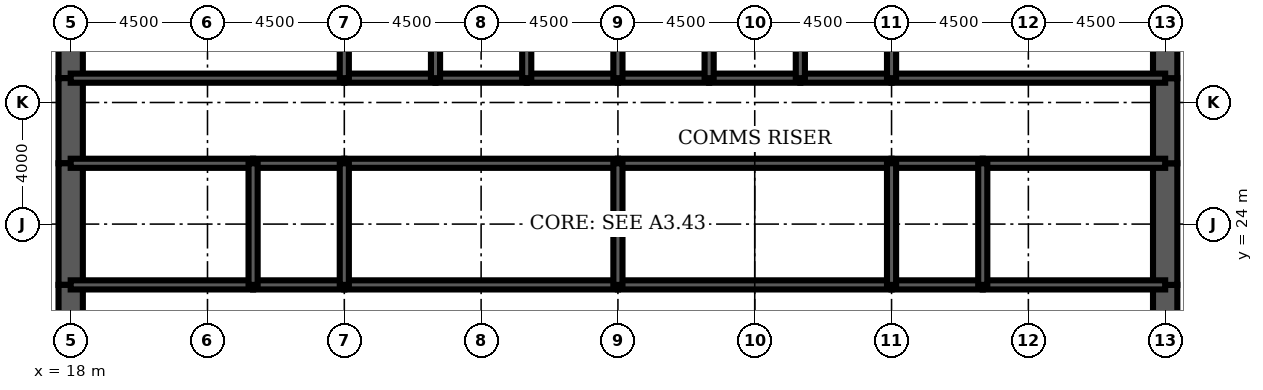
"""IFC4 building model, lengths in metres.
Left out: names, types, materials, properties, quantities, classifications, styles, units other than length and angle.
Written with IfcOpenShell. Run it as: python <this file> out.ifc"""

import sys

from ifc_helpers import new_model, si_unit, direction, frame, frame_2d, origin, place, context, subcontext, project, spatial, rectangle, extrude, element, fill, save


model = new_model("IFC4")
c1 = context("Model", 3, precision=1e-05, world=origin(), true_north=direction((0.0, 1.0)))
c2 = subcontext(c1, "Body", "Model", "MODEL_VIEW")
j1 = project(units=[si_unit("LENGTHUNIT", "METRE"), si_unit("PLANEANGLEUNIT", "RADIAN")], contexts=[c1])
p1 = place(None, origin())
s1 = spatial("IfcSite", under=j1, at=p1, CompositionType="ELEMENT")
p2 = place(p1, origin())
s2 = spatial("IfcBuilding", under=s1, at=p2, CompositionType="ELEMENT")
p3 = place(p2, frame((0.0, 0.0, 185.8)))
s3 = spatial("IfcBuildingStorey", under=s2, at=p3, CompositionType="ELEMENT", Elevation=185.8)
p4 = place(p3, frame((18.0, 32.0, 0.0), z_axis=(0.0, 0.0, 1.0), x_axis=(0.0, -1.0, 0.0)))
e1 = element("IfcWall", 1, at=p4, inside=s3, PredefinedType="SHEAR", context=c2, shape_type="SweptSolid", body=[
    extrude(rectangle(XDim=3.2, YDim=0.8, at=frame_2d((1.6, 0.0))), origin(), (0.0, 0.0, 1.0), 4.2),
])
p5 = place(p3, frame((18.0, 28.8, 0.0), z_axis=(0.0, 0.0, 1.0), x_axis=(0.0, -1.0, 0.0)))
e2 = element("IfcWall", 2, at=p5, inside=s3, PredefinedType="SHEAR", context=c2, shape_type="SweptSolid", body=[
    extrude(rectangle(XDim=2.8, YDim=0.8, at=frame_2d((1.4, 0.0))), origin(), (0.0, 0.0, 1.0), 4.2),
])
p6 = place(p5, frame((0.4, 0.0, 0.0)))
e3 = element("IfcOpeningElement", 3, at=p6, cuts=e2, PredefinedType="OPENING", context=c2, shape_type="SweptSolid", body=[
    extrude(rectangle(XDim=1.8, YDim=2.1, at=frame_2d((0.9, 1.05))), frame((0.0, 0.41, 0.0), z_axis=(0.0, -1.0, 0.0), x_axis=(1.0, 0.0, 0.0)), (0.0, 0.0, 1.0), 0.82),
])
p7 = place(p3, frame((18.0, 26.0, 0.0), z_axis=(0.0, 0.0, 1.0), x_axis=(0.0, -1.0, 0.0)))
e4 = element("IfcWall", 4, at=p7, inside=s3, PredefinedType="SHEAR", context=c2, shape_type="SweptSolid", body=[
    extrude(rectangle(XDim=4.0, YDim=0.8, at=frame_2d((2.0, 0.0))), origin(), (0.0, 0.0, 1.0), 4.2),
])
p8 = place(p3, frame((18.0, 22.0, 0.0), z_axis=(0.0, 0.0, 1.0), x_axis=(0.0, -1.0, 0.0)))
e5 = element("IfcWall", 5, at=p8, inside=s3, PredefinedType="SHEAR", context=c2, shape_type="SweptSolid", body=[
    extrude(rectangle(XDim=2.8, YDim=0.8, at=frame_2d((1.4, 0.0))), origin(), (0.0, 0.0, 1.0), 4.2),
])
p9 = place(p8, frame((0.6, 0.0, 0.0)))
e6 = element("IfcOpeningElement", 6, at=p9, cuts=e5, PredefinedType="OPENING", context=c2, shape_type="SweptSolid", body=[
    extrude(rectangle(XDim=1.8, YDim=2.1, at=frame_2d((0.9, 1.05))), frame((0.0, 0.41, 0.0), z_axis=(0.0, -1.0, 0.0), x_axis=(1.0, 0.0, 0.0)), (0.0, 0.0, 1.0), 0.82),
])
p10 = place(p3, frame((54.0, 19.2, 0.0), z_axis=(0.0, 0.0, 1.0), x_axis=(0.0, 1.0, 0.0)))
e7 = element("IfcWall", 7, at=p10, inside=s3, PredefinedType="SHEAR", context=c2, shape_type="SweptSolid", body=[
    extrude(rectangle(XDim=2.8, YDim=0.8, at=frame_2d((1.4, 0.0))), origin(), (0.0, 0.0, 1.0), 4.2),
])
p11 = place(p10, frame((0.4, 0.0, 0.0)))
e8 = element("IfcOpeningElement", 8, at=p11, cuts=e7, PredefinedType="OPENING", context=c2, shape_type="SweptSolid", body=[
    extrude(rectangle(XDim=1.8, YDim=2.1, at=frame_2d((0.9, 1.05))), frame((0.0, 0.41, 0.0), z_axis=(0.0, -1.0, 0.0), x_axis=(1.0, 0.0, 0.0)), (0.0, 0.0, 1.0), 0.82),
])
p12 = place(p3, frame((54.0, 22.0, 0.0), z_axis=(0.0, 0.0, 1.0), x_axis=(0.0, 1.0, 0.0)))
e9 = element("IfcWall", 9, at=p12, inside=s3, PredefinedType="SHEAR", context=c2, shape_type="SweptSolid", body=[
    extrude(rectangle(XDim=4.0, YDim=0.8, at=frame_2d((2.0, 0.0))), origin(), (0.0, 0.0, 1.0), 4.2),
])
p13 = place(p3, frame((54.0, 26.0, 0.0), z_axis=(0.0, 0.0, 1.0), x_axis=(0.0, 1.0, 0.0)))
e10 = element("IfcWall", 10, at=p13, inside=s3, PredefinedType="SHEAR", context=c2, shape_type="SweptSolid", body=[
    extrude(rectangle(XDim=2.8, YDim=0.8, at=frame_2d((1.4, 0.0))), origin(), (0.0, 0.0, 1.0), 4.2),
])
p14 = place(p13, frame((0.6, 0.0, 0.0)))
e11 = element("IfcOpeningElement", 11, at=p14, cuts=e10, PredefinedType="OPENING", context=c2, shape_type="SweptSolid", body=[
    extrude(rectangle(XDim=1.8, YDim=2.1, at=frame_2d((0.9, 1.05))), frame((0.0, 0.41, 0.0), z_axis=(0.0, -1.0, 0.0), x_axis=(1.0, 0.0, 0.0)), (0.0, 0.0, 1.0), 0.82),
])
p15 = place(p3, frame((54.0, 28.8, 0.0), z_axis=(0.0, 0.0, 1.0), x_axis=(0.0, 1.0, 0.0)))
e12 = element("IfcWall", 12, at=p15, inside=s3, PredefinedType="SHEAR", context=c2, shape_type="SweptSolid", body=[
    extrude(rectangle(XDim=3.2, YDim=0.8, at=frame_2d((1.6, 0.0))), origin(), (0.0, 0.0, 1.0), 4.2),
])
p16 = place(p3, frame((18.0, 28.8, 0.0), z_axis=(0.0, 0.0, 1.0), x_axis=(1.0, 0.0, 0.0)))
e13 = element("IfcWall", 13, at=p16, inside=s3, PredefinedType="SOLIDWALL", context=c2, shape_type="SweptSolid", body=[
    extrude(rectangle(XDim=9.0, YDim=0.3, at=frame_2d((4.5, 0.0))), origin(), (0.0, 0.0, 1.0), 4.2),
])
p17 = place(p16, frame((0.65, 0.0, 0.0)))
e14 = element("IfcOpeningElement", 14, at=p17, cuts=e13, PredefinedType="OPENING", context=c2, shape_type="SweptSolid", body=[
    extrude(rectangle(XDim=1.0, YDim=2.1, at=frame_2d((0.5, 1.05))), frame((0.0, 0.16, 0.0), z_axis=(0.0, -1.0, 0.0), x_axis=(1.0, 0.0, 0.0)), (0.0, 0.0, 1.0), 0.32),
])
p18 = place(p3, frame((27.0, 28.8, 0.0), z_axis=(0.0, 0.0, 1.0), x_axis=(1.0, 0.0, 0.0)))
e15 = element("IfcWall", 15, at=p18, inside=s3, PredefinedType="SOLIDWALL", context=c2, shape_type="SweptSolid", body=[
    extrude(rectangle(XDim=3.0, YDim=0.3, at=frame_2d((1.5, 0.0))), origin(), (0.0, 0.0, 1.0), 4.2),
])
p19 = place(p18, frame((0.95, 0.0, 0.0)))
e16 = element("IfcOpeningElement", 16, at=p19, cuts=e15, PredefinedType="OPENING", context=c2, shape_type="SweptSolid", body=[
    extrude(rectangle(XDim=1.1, YDim=2.2, at=frame_2d((0.55, 1.1))), frame((0.0, 0.16, 0.0), z_axis=(0.0, -1.0, 0.0), x_axis=(1.0, 0.0, 0.0)), (0.0, 0.0, 1.0), 0.32),
])
p20 = place(p3, frame((30.0, 28.8, 0.0), z_axis=(0.0, 0.0, 1.0), x_axis=(1.0, 0.0, 0.0)))
e17 = element("IfcWall", 17, at=p20, inside=s3, PredefinedType="SOLIDWALL", context=c2, shape_type="SweptSolid", body=[
    extrude(rectangle(XDim=3.0, YDim=0.3, at=frame_2d((1.5, 0.0))), origin(), (0.0, 0.0, 1.0), 4.2),
])
p21 = place(p20, frame((0.95, 0.0, 0.0)))
e18 = element("IfcOpeningElement", 18, at=p21, cuts=e17, PredefinedType="OPENING", context=c2, shape_type="SweptSolid", body=[
    extrude(rectangle(XDim=1.1, YDim=2.2, at=frame_2d((0.55, 1.1))), frame((0.0, 0.16, 0.0), z_axis=(0.0, -1.0, 0.0), x_axis=(1.0, 0.0, 0.0)), (0.0, 0.0, 1.0), 0.32),
])
p22 = place(p3, frame((33.0, 28.8, 0.0), z_axis=(0.0, 0.0, 1.0), x_axis=(1.0, 0.0, 0.0)))
e19 = element("IfcWall", 19, at=p22, inside=s3, PredefinedType="SOLIDWALL", context=c2, shape_type="SweptSolid", body=[
    extrude(rectangle(XDim=3.0, YDim=0.3, at=frame_2d((1.5, 0.0))), origin(), (0.0, 0.0, 1.0), 4.2),
])
p23 = place(p22, frame((0.95, 0.0, 0.0)))
e20 = element("IfcOpeningElement", 20, at=p23, cuts=e19, PredefinedType="OPENING", context=c2, shape_type="SweptSolid", body=[
    extrude(rectangle(XDim=1.1, YDim=2.2, at=frame_2d((0.55, 1.1))), frame((0.0, 0.16, 0.0), z_axis=(0.0, -1.0, 0.0), x_axis=(1.0, 0.0, 0.0)), (0.0, 0.0, 1.0), 0.32),
])
for number, where, z_axis, x_axis in (
    (21, (36.0, 28.8, 0.0), (0.0, 0.0, 1.0), (1.0, 0.0, 0.0)),
    (22, (39.0, 28.8, 0.0), (0.0, 0.0, 1.0), (1.0, 0.0, 0.0)),
):
    element("IfcWall", number, at=place(p3, frame(where, z_axis=z_axis, x_axis=x_axis)), inside=s3, PredefinedType="SOLIDWALL", context=c2, shape_type="SweptSolid", body=[
        extrude(rectangle(XDim=3.0, YDim=0.3, at=frame_2d((1.5, 0.0))), origin(), (0.0, 0.0, 1.0), 4.2),
    ])
p24 = place(p3, frame((42.0, 28.8, 0.0), z_axis=(0.0, 0.0, 1.0), x_axis=(1.0, 0.0, 0.0)))
e23 = element("IfcWall", 23, at=p24, inside=s3, PredefinedType="SOLIDWALL", context=c2, shape_type="SweptSolid", body=[
    extrude(rectangle(XDim=3.0, YDim=0.3, at=frame_2d((1.5, 0.0))), origin(), (0.0, 0.0, 1.0), 4.2),
])
p25 = place(p24, frame((0.95, 0.0, 0.0)))
e24 = element("IfcOpeningElement", 24, at=p25, cuts=e23, PredefinedType="OPENING", context=c2, shape_type="SweptSolid", body=[
    extrude(rectangle(XDim=1.1, YDim=2.2, at=frame_2d((0.55, 1.1))), frame((0.0, 0.16, 0.0), z_axis=(0.0, -1.0, 0.0), x_axis=(1.0, 0.0, 0.0)), (0.0, 0.0, 1.0), 0.32),
])
p26 = place(p3, frame((45.0, 28.8, 0.0), z_axis=(0.0, 0.0, 1.0), x_axis=(1.0, 0.0, 0.0)))
e25 = element("IfcWall", 25, at=p26, inside=s3, PredefinedType="SOLIDWALL", context=c2, shape_type="SweptSolid", body=[
    extrude(rectangle(XDim=9.0, YDim=0.3, at=frame_2d((4.5, 0.0))), origin(), (0.0, 0.0, 1.0), 4.2),
])
p27 = place(p26, frame((7.35, 0.0, 0.0)))
e26 = element("IfcOpeningElement", 26, at=p27, cuts=e25, PredefinedType="OPENING", context=c2, shape_type="SweptSolid", body=[
    extrude(rectangle(XDim=1.0, YDim=2.1, at=frame_2d((0.5, 1.05))), frame((0.0, 0.16, 0.0), z_axis=(0.0, -1.0, 0.0), x_axis=(1.0, 0.0, 0.0)), (0.0, 0.0, 1.0), 0.32),
])
p28 = place(p3, frame((18.0, 22.0, 0.0), z_axis=(0.0, 0.0, 1.0), x_axis=(1.0, 0.0, 0.0)))
e27 = element("IfcWall", 27, at=p28, inside=s3, PredefinedType="SOLIDWALL", context=c2, shape_type="SweptSolid", body=[
    extrude(rectangle(XDim=6.0, YDim=0.3, at=frame_2d((3.0, 0.0))), origin(), (0.0, 0.0, 1.0), 4.2),
])
p29 = place(p28, frame((2.0, 0.0, 0.0)))
e28 = element("IfcOpeningElement", 28, at=p29, cuts=e27, PredefinedType="OPENING", context=c2, shape_type="SweptSolid", body=[
    extrude(rectangle(XDim=1.0, YDim=2.1, at=frame_2d((0.5, 1.05))), frame((0.0, 0.16, 0.0), z_axis=(0.0, -1.0, 0.0), x_axis=(1.0, 0.0, 0.0)), (0.0, 0.0, 1.0), 0.32),
])
p30 = place(p3, frame((24.0, 22.0, 0.0), z_axis=(0.0, 0.0, 1.0), x_axis=(1.0, 0.0, 0.0)))
e29 = element("IfcWall", 29, at=p30, inside=s3, PredefinedType="SOLIDWALL", context=c2, shape_type="SweptSolid", body=[
    extrude(rectangle(XDim=3.0, YDim=0.3, at=frame_2d((1.5, 0.0))), origin(), (0.0, 0.0, 1.0), 4.2),
])
p31 = place(p30, frame((1.0, 0.0, 0.0)))
e30 = element("IfcOpeningElement", 30, at=p31, cuts=e29, PredefinedType="OPENING", context=c2, shape_type="SweptSolid", body=[
    extrude(rectangle(XDim=1.0, YDim=2.1, at=frame_2d((0.5, 1.05))), frame((0.0, 0.16, 0.0), z_axis=(0.0, -1.0, 0.0), x_axis=(1.0, 0.0, 0.0)), (0.0, 0.0, 1.0), 0.32),
])
p32 = place(p3, frame((27.0, 22.0, 0.0), z_axis=(0.0, 0.0, 1.0), x_axis=(1.0, 0.0, 0.0)))
e31 = element("IfcWall", 31, at=p32, inside=s3, PredefinedType="SOLIDWALL", context=c2, shape_type="SweptSolid", body=[
    extrude(rectangle(XDim=9.0, YDim=0.3, at=frame_2d((4.5, 0.0))), origin(), (0.0, 0.0, 1.0), 4.2),
])
p33 = place(p32, frame((4.0, 0.0, 0.0)))
e32 = element("IfcOpeningElement", 32, at=p33, cuts=e31, PredefinedType="OPENING", context=c2, shape_type="SweptSolid", body=[
    extrude(rectangle(XDim=1.0, YDim=2.1, at=frame_2d((0.5, 1.05))), frame((0.0, 0.16, 0.0), z_axis=(0.0, -1.0, 0.0), x_axis=(1.0, 0.0, 0.0)), (0.0, 0.0, 1.0), 0.32),
])
p34 = place(p3, frame((36.0, 22.0, 0.0), z_axis=(0.0, 0.0, 1.0), x_axis=(1.0, 0.0, 0.0)))
e33 = element("IfcWall", 33, at=p34, inside=s3, PredefinedType="SOLIDWALL", context=c2, shape_type="SweptSolid", body=[
    extrude(rectangle(XDim=9.0, YDim=0.3, at=frame_2d((4.5, 0.0))), origin(), (0.0, 0.0, 1.0), 4.2),
])
p35 = place(p34, frame((4.0, 0.0, 0.0)))
e34 = element("IfcOpeningElement", 34, at=p35, cuts=e33, PredefinedType="OPENING", context=c2, shape_type="SweptSolid", body=[
    extrude(rectangle(XDim=1.0, YDim=2.1, at=frame_2d((0.5, 1.05))), frame((0.0, 0.16, 0.0), z_axis=(0.0, -1.0, 0.0), x_axis=(1.0, 0.0, 0.0)), (0.0, 0.0, 1.0), 0.32),
])
p36 = place(p3, frame((45.0, 22.0, 0.0), z_axis=(0.0, 0.0, 1.0), x_axis=(1.0, 0.0, 0.0)))
e35 = element("IfcWall", 35, at=p36, inside=s3, PredefinedType="SOLIDWALL", context=c2, shape_type="SweptSolid", body=[
    extrude(rectangle(XDim=3.0, YDim=0.3, at=frame_2d((1.5, 0.0))), origin(), (0.0, 0.0, 1.0), 4.2),
])
p37 = place(p36, frame((1.0, 0.0, 0.0)))
e36 = element("IfcOpeningElement", 36, at=p37, cuts=e35, PredefinedType="OPENING", context=c2, shape_type="SweptSolid", body=[
    extrude(rectangle(XDim=1.0, YDim=2.1, at=frame_2d((0.5, 1.05))), frame((0.0, 0.16, 0.0), z_axis=(0.0, -1.0, 0.0), x_axis=(1.0, 0.0, 0.0)), (0.0, 0.0, 1.0), 0.32),
])
p38 = place(p3, frame((48.0, 22.0, 0.0), z_axis=(0.0, 0.0, 1.0), x_axis=(1.0, 0.0, 0.0)))
e37 = element("IfcWall", 37, at=p38, inside=s3, PredefinedType="SOLIDWALL", context=c2, shape_type="SweptSolid", body=[
    extrude(rectangle(XDim=6.0, YDim=0.3, at=frame_2d((3.0, 0.0))), origin(), (0.0, 0.0, 1.0), 4.2),
])
p39 = place(p38, frame((2.0, 0.0, 0.0)))
e38 = element("IfcOpeningElement", 38, at=p39, cuts=e37, PredefinedType="OPENING", context=c2, shape_type="SweptSolid", body=[
    extrude(rectangle(XDim=1.0, YDim=2.1, at=frame_2d((0.5, 1.05))), frame((0.0, 0.16, 0.0), z_axis=(0.0, -1.0, 0.0), x_axis=(1.0, 0.0, 0.0)), (0.0, 0.0, 1.0), 0.32),
])
p40 = place(p3, frame((18.0, 26.0, 0.0), z_axis=(0.0, 0.0, 1.0), x_axis=(1.0, 0.0, 0.0)))
e39 = element("IfcWall", 39, at=p40, inside=s3, PredefinedType="SOLIDWALL", context=c2, shape_type="SweptSolid", body=[
    extrude(rectangle(XDim=6.0, YDim=0.3, at=frame_2d((3.0, 0.0))), origin(), (0.0, 0.0, 1.0), 4.2),
])
p41 = place(p3, frame((24.0, 26.0, 0.0), z_axis=(0.0, 0.0, 1.0), x_axis=(1.0, 0.0, 0.0)))
e40 = element("IfcWall", 40, at=p41, inside=s3, PredefinedType="SOLIDWALL", context=c2, shape_type="SweptSolid", body=[
    extrude(rectangle(XDim=3.0, YDim=0.3, at=frame_2d((1.5, 0.0))), origin(), (0.0, 0.0, 1.0), 4.2),
])
for number, where, z_axis, x_axis in (
    (41, (27.0, 26.0, 0.0), (0.0, 0.0, 1.0), (1.0, 0.0, 0.0)),
    (42, (36.0, 26.0, 0.0), (0.0, 0.0, 1.0), (1.0, 0.0, 0.0)),
):
    element("IfcWall", number, at=place(p3, frame(where, z_axis=z_axis, x_axis=x_axis)), inside=s3, PredefinedType="SOLIDWALL", context=c2, shape_type="SweptSolid", body=[
        extrude(rectangle(XDim=9.0, YDim=0.3, at=frame_2d((4.5, 0.0))), origin(), (0.0, 0.0, 1.0), 4.2),
    ])
p42 = place(p3, frame((45.0, 26.0, 0.0), z_axis=(0.0, 0.0, 1.0), x_axis=(1.0, 0.0, 0.0)))
e43 = element("IfcWall", 43, at=p42, inside=s3, PredefinedType="SOLIDWALL", context=c2, shape_type="SweptSolid", body=[
    extrude(rectangle(XDim=3.0, YDim=0.3, at=frame_2d((1.5, 0.0))), origin(), (0.0, 0.0, 1.0), 4.2),
])
p43 = place(p3, frame((48.0, 26.0, 0.0), z_axis=(0.0, 0.0, 1.0), x_axis=(1.0, 0.0, 0.0)))
e44 = element("IfcWall", 44, at=p43, inside=s3, PredefinedType="SOLIDWALL", context=c2, shape_type="SweptSolid", body=[
    extrude(rectangle(XDim=6.0, YDim=0.3, at=frame_2d((3.0, 0.0))), origin(), (0.0, 0.0, 1.0), 4.2),
])
for number, where, z_axis, x_axis in (
    (45, (27.0, 28.8, 0.0), (0.0, 0.0, 1.0), (0.0, 1.0, 0.0)),
    (46, (30.0, 28.8, 0.0), (0.0, 0.0, 1.0), (0.0, 1.0, 0.0)),
    (47, (33.0, 28.8, 0.0), (0.0, 0.0, 1.0), (0.0, 1.0, 0.0)),
    (48, (36.0, 28.8, 0.0), (0.0, 0.0, 1.0), (0.0, 1.0, 0.0)),
    (49, (39.0, 28.8, 0.0), (0.0, 0.0, 1.0), (0.0, 1.0, 0.0)),
    (50, (42.0, 28.8, 0.0), (0.0, 0.0, 1.0), (0.0, 1.0, 0.0)),
    (51, (45.0, 28.8, 0.0), (0.0, 0.0, 1.0), (0.0, 1.0, 0.0)),
):
    element("IfcWall", number, at=place(p3, frame(where, z_axis=z_axis, x_axis=x_axis)), inside=s3, PredefinedType="SOLIDWALL", context=c2, shape_type="SweptSolid", body=[
        extrude(rectangle(XDim=3.2, YDim=0.3, at=frame_2d((1.6, 0.0))), origin(), (0.0, 0.0, 1.0), 4.2),
    ])
for number, where, z_axis, x_axis in (
    (52, (24.0, 22.0, 0.0), (0.0, 0.0, 1.0), (0.0, 1.0, 0.0)),
    (53, (27.0, 22.0, 0.0), (0.0, 0.0, 1.0), (0.0, 1.0, 0.0)),
    (54, (36.0, 22.0, 0.0), (0.0, 0.0, 1.0), (0.0, 1.0, 0.0)),
    (55, (45.0, 22.0, 0.0), (0.0, 0.0, 1.0), (0.0, 1.0, 0.0)),
    (56, (48.0, 22.0, 0.0), (0.0, 0.0, 1.0), (0.0, 1.0, 0.0)),
):
    element("IfcWall", number, at=place(p3, frame(where, z_axis=z_axis, x_axis=x_axis)), inside=s3, PredefinedType="SOLIDWALL", context=c2, shape_type="SweptSolid", body=[
        extrude(rectangle(XDim=4.0, YDim=0.3, at=frame_2d((2.0, 0.0))), origin(), (0.0, 0.0, 1.0), 4.2),
    ])
p44 = place(p25, origin())
e57 = element("IfcDoor", 57, at=p44, inside=s3, OperationType="DOUBLE_DOOR_SLIDING", PredefinedType="USERDEFINED", context=c2, shape_type="SweptSolid", body=[
    extrude(rectangle(XDim=1.1, YDim=2.2, at=frame_2d((0.55, 1.1))), frame((0.0, 0.025, 0.0), z_axis=(0.0, -1.0, 0.0), x_axis=(1.0, 0.0, 0.0)), (0.0, 0.0, 1.0), 0.05),
])
fill(e24, e57)
p45 = place(p19, origin())
e58 = element("IfcDoor", 58, at=p45, inside=s3, OperationType="DOUBLE_DOOR_SLIDING", PredefinedType="USERDEFINED", context=c2, shape_type="SweptSolid", body=[
    extrude(rectangle(XDim=1.1, YDim=2.2, at=frame_2d((0.55, 1.1))), frame((0.0, 0.025, 0.0), z_axis=(0.0, -1.0, 0.0), x_axis=(1.0, 0.0, 0.0)), (0.0, 0.0, 1.0), 0.05),
])
fill(e16, e58)
p46 = place(p21, origin())
e59 = element("IfcDoor", 59, at=p46, inside=s3, OperationType="DOUBLE_DOOR_SLIDING", PredefinedType="USERDEFINED", context=c2, shape_type="SweptSolid", body=[
    extrude(rectangle(XDim=1.1, YDim=2.2, at=frame_2d((0.55, 1.1))), frame((0.0, 0.025, 0.0), z_axis=(0.0, -1.0, 0.0), x_axis=(1.0, 0.0, 0.0)), (0.0, 0.0, 1.0), 0.05),
])
fill(e18, e59)
p47 = place(p23, origin())
e60 = element("IfcDoor", 60, at=p47, inside=s3, OperationType="DOUBLE_DOOR_SLIDING", PredefinedType="USERDEFINED", context=c2, shape_type="SweptSolid", body=[
    extrude(rectangle(XDim=1.1, YDim=2.2, at=frame_2d((0.55, 1.1))), frame((0.0, 0.025, 0.0), z_axis=(0.0, -1.0, 0.0), x_axis=(1.0, 0.0, 0.0)), (0.0, 0.0, 1.0), 0.05),
])
fill(e20, e60)
p48 = place(p17, origin())
e61 = element("IfcDoor", 61, at=p48, inside=s3, OperationType="SINGLE_SWING_LEFT", PredefinedType="DOOR", context=c2, shape_type="SweptSolid", body=[
    extrude(rectangle(XDim=1.0, YDim=2.1, at=frame_2d((0.5, 1.05))), frame((0.0, 0.025, 0.0), z_axis=(0.0, -1.0, 0.0), x_axis=(1.0, 0.0, 0.0)), (0.0, 0.0, 1.0), 0.05),
])
fill(e14, e61)
p49 = place(p27, origin())
e62 = element("IfcDoor", 62, at=p49, inside=s3, OperationType="SINGLE_SWING_RIGHT", PredefinedType="DOOR", context=c2, shape_type="SweptSolid", body=[
    extrude(rectangle(XDim=1.0, YDim=2.1, at=frame_2d((0.5, 1.05))), frame((0.0, 0.025, 0.0), z_axis=(0.0, -1.0, 0.0), x_axis=(1.0, 0.0, 0.0)), (0.0, 0.0, 1.0), 0.05),
])
fill(e26, e62)
p50 = place(p9, origin())
e63 = element("IfcDoor", 63, at=p50, inside=s3, OperationType="SINGLE_SWING_LEFT", PredefinedType="DOOR", context=c2, shape_type="SweptSolid", body=[
    extrude(rectangle(XDim=1.8, YDim=2.1, at=frame_2d((0.9, 1.05))), frame((0.0, 0.4, 0.0), z_axis=(0.0, -1.0, 0.0), x_axis=(1.0, 0.0, 0.0)), (0.0, 0.0, 1.0), 0.8),
])
fill(e6, e63)
p51 = place(p6, origin())
e64 = element("IfcDoor", 64, at=p51, inside=s3, OperationType="SINGLE_SWING_LEFT", PredefinedType="DOOR", context=c2, shape_type="SweptSolid", body=[
    extrude(rectangle(XDim=1.8, YDim=2.1, at=frame_2d((0.9, 1.05))), frame((0.0, 0.4, 0.0), z_axis=(0.0, -1.0, 0.0), x_axis=(1.0, 0.0, 0.0)), (0.0, 0.0, 1.0), 0.8),
])
fill(e3, e64)
p52 = place(p11, origin())
e65 = element("IfcDoor", 65, at=p52, inside=s3, OperationType="SINGLE_SWING_LEFT", PredefinedType="DOOR", context=c2, shape_type="SweptSolid", body=[
    extrude(rectangle(XDim=1.8, YDim=2.1, at=frame_2d((0.9, 1.05))), frame((0.0, 0.4, 0.0), z_axis=(0.0, -1.0, 0.0), x_axis=(1.0, 0.0, 0.0)), (0.0, 0.0, 1.0), 0.8),
])
fill(e8, e65)
p53 = place(p14, origin())
e66 = element("IfcDoor", 66, at=p53, inside=s3, OperationType="SINGLE_SWING_LEFT", PredefinedType="DOOR", context=c2, shape_type="SweptSolid", body=[
    extrude(rectangle(XDim=1.8, YDim=2.1, at=frame_2d((0.9, 1.05))), frame((0.0, 0.4, 0.0), z_axis=(0.0, -1.0, 0.0), x_axis=(1.0, 0.0, 0.0)), (0.0, 0.0, 1.0), 0.8),
])
fill(e11, e66)
p54 = place(p29, origin())
e67 = element("IfcDoor", 67, at=p54, inside=s3, OperationType="SINGLE_SWING_LEFT", PredefinedType="DOOR", context=c2, shape_type="SweptSolid", body=[
    extrude(rectangle(XDim=1.0, YDim=2.1, at=frame_2d((0.5, 1.05))), frame((0.0, 0.025, 0.0), z_axis=(0.0, -1.0, 0.0), x_axis=(1.0, 0.0, 0.0)), (0.0, 0.0, 1.0), 0.05),
])
fill(e28, e67)
p55 = place(p31, origin())
e68 = element("IfcDoor", 68, at=p55, inside=s3, OperationType="SINGLE_SWING_LEFT", PredefinedType="DOOR", context=c2, shape_type="SweptSolid", body=[
    extrude(rectangle(XDim=1.0, YDim=2.1, at=frame_2d((0.5, 1.05))), frame((0.0, 0.025, 0.0), z_axis=(0.0, -1.0, 0.0), x_axis=(1.0, 0.0, 0.0)), (0.0, 0.0, 1.0), 0.05),
])
fill(e30, e68)
p56 = place(p33, origin())
e69 = element("IfcDoor", 69, at=p56, inside=s3, OperationType="SINGLE_SWING_LEFT", PredefinedType="DOOR", context=c2, shape_type="SweptSolid", body=[
    extrude(rectangle(XDim=1.0, YDim=2.1, at=frame_2d((0.5, 1.05))), frame((0.0, 0.025, 0.0), z_axis=(0.0, -1.0, 0.0), x_axis=(1.0, 0.0, 0.0)), (0.0, 0.0, 1.0), 0.05),
])
fill(e32, e69)
p57 = place(p35, origin())
e70 = element("IfcDoor", 70, at=p57, inside=s3, OperationType="SINGLE_SWING_LEFT", PredefinedType="DOOR", context=c2, shape_type="SweptSolid", body=[
    extrude(rectangle(XDim=1.0, YDim=2.1, at=frame_2d((0.5, 1.05))), frame((0.0, 0.025, 0.0), z_axis=(0.0, -1.0, 0.0), x_axis=(1.0, 0.0, 0.0)), (0.0, 0.0, 1.0), 0.05),
])
fill(e34, e70)
p58 = place(p37, origin())
e71 = element("IfcDoor", 71, at=p58, inside=s3, OperationType="SINGLE_SWING_LEFT", PredefinedType="DOOR", context=c2, shape_type="SweptSolid", body=[
    extrude(rectangle(XDim=1.0, YDim=2.1, at=frame_2d((0.5, 1.05))), frame((0.0, 0.025, 0.0), z_axis=(0.0, -1.0, 0.0), x_axis=(1.0, 0.0, 0.0)), (0.0, 0.0, 1.0), 0.05),
])
fill(e36, e71)
p59 = place(p39, origin())
e72 = element("IfcDoor", 72, at=p59, inside=s3, OperationType="SINGLE_SWING_LEFT", PredefinedType="DOOR", context=c2, shape_type="SweptSolid", body=[
    extrude(rectangle(XDim=1.0, YDim=2.1, at=frame_2d((0.5, 1.05))), frame((0.0, 0.025, 0.0), z_axis=(0.0, -1.0, 0.0), x_axis=(1.0, 0.0, 0.0)), (0.0, 0.0, 1.0), 0.05),
])
fill(e38, e72)
save(model, sys.argv[1])
